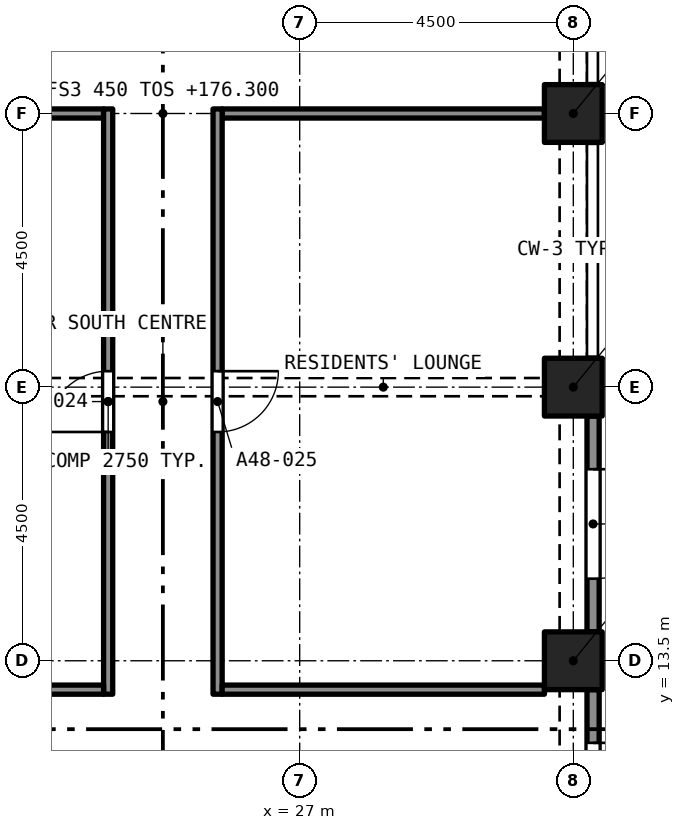
"""IFC4 building model, lengths in metres.
Left out: names, types, materials, properties, quantities, classifications, styles, units other than length and angle.
Written with IfcOpenShell. Run it as: python <this file> out.ifc"""

import sys

from ifc_helpers import new_model, si_unit, direction, frame, frame_2d, origin, origin_2d, place, context, subcontext, project, spatial, rectangle, extrude, element, fill, save


model = new_model("IFC4")
c1 = context("Model", 3, precision=1e-05, world=origin(), true_north=direction((0.0, 1.0)))
c2 = subcontext(c1, "Body", "Model", "MODEL_VIEW")
j1 = project(units=[si_unit("LENGTHUNIT", "METRE"), si_unit("PLANEANGLEUNIT", "RADIAN")], contexts=[c1])
p1 = place(None, origin())
s1 = spatial("IfcSite", under=j1, at=p1, CompositionType="ELEMENT")
p2 = place(p1, origin())
s2 = spatial("IfcBuilding", under=s1, at=p2, CompositionType="ELEMENT")
p3 = place(p2, frame((0.0, 0.0, 176.3)))
s3 = spatial("IfcBuildingStorey", under=s2, at=p3, CompositionType="ELEMENT", Elevation=176.3)
for number, where, z_axis, x_axis in (
    (1, (31.5, 13.5, 0.0), (0.0, 0.0, 1.0), (1.0, 0.0, 0.0)),
    (2, (31.5, 18.0, 0.0), (0.0, 0.0, 1.0), (1.0, 0.0, 0.0)),
    (3, (31.5, 22.5, 0.0), (0.0, 0.0, 1.0), (1.0, 0.0, 0.0)),
):
    element("IfcColumn", number, at=place(p3, frame(where, z_axis=z_axis, x_axis=x_axis)), inside=s3, PredefinedType="COLUMN", context=c2, shape_type="SweptSolid", body=[
        extrude(rectangle(XDim=0.95, YDim=0.95, at=origin_2d()), origin(), (0.0, 0.0, 1.0), 3.2),
    ])
p4 = place(p3, frame((31.825, 13.025, 0.0), z_axis=(0.0, 0.0, 1.0), x_axis=(0.0, -1.0, 0.0)))
e4 = element("IfcWall", 4, at=p4, inside=s3, PredefinedType="SOLIDWALL", context=c2, shape_type="SweptSolid", body=[
    extrude(rectangle(XDim=3.55, YDim=0.2, at=frame_2d((1.775, 0.0))), origin(), (0.0, 0.0, 1.0), 3.2),
])
p5 = place(p4, frame((0.875, 0.0, 0.0)))
e5 = element("IfcOpeningElement", 5, at=p5, cuts=e4, PredefinedType="OPENING", context=c2, shape_type="SweptSolid", body=[
    extrude(rectangle(XDim=1.8, YDim=2.4, at=frame_2d((0.9, 1.2))), frame((0.0, 0.11, 0.0), z_axis=(0.0, -1.0, 0.0), x_axis=(1.0, 0.0, 0.0)), (0.0, 0.0, 1.0), 0.22),
])
p6 = place(p3, frame((31.825, 17.525, 0.0), z_axis=(0.0, 0.0, 1.0), x_axis=(0.0, -1.0, 0.0)))
e6 = element("IfcWall", 6, at=p6, inside=s3, PredefinedType="SOLIDWALL", context=c2, shape_type="SweptSolid", body=[
    extrude(rectangle(XDim=3.55, YDim=0.2, at=frame_2d((1.775, 0.0))), origin(), (0.0, 0.0, 1.0), 3.2),
])
p7 = place(p6, frame((0.875, 0.0, 0.0)))
e7 = element("IfcOpeningElement", 7, at=p7, cuts=e6, PredefinedType="OPENING", context=c2, shape_type="SweptSolid", body=[
    extrude(rectangle(XDim=1.8, YDim=2.4, at=frame_2d((0.9, 1.2))), frame((0.0, 0.11, 0.0), z_axis=(0.0, -1.0, 0.0), x_axis=(1.0, 0.0, 0.0)), (0.0, 0.0, 1.0), 0.22),
])
for number, where, z_axis, x_axis in (
    (8, (18.475, 22.5, 0.0), (0.0, 0.0, 1.0), (1.0, 0.0, 0.0)),
    (9, (25.725, 22.5, 0.0), (0.0, 0.0, 1.0), (1.0, 0.0, 0.0)),
):
    element("IfcWall", number, at=place(p3, frame(where, z_axis=z_axis, x_axis=x_axis)), inside=s3, PredefinedType="PARTITIONING", context=c2, shape_type="SweptSolid", body=[
        extrude(rectangle(XDim=5.3, YDim=0.15, at=frame_2d((2.65, 0.0))), origin(), (0.0, 0.0, 1.0), 2.75),
    ])
p8 = place(p3, frame((23.85, 12.95, 0.0), z_axis=(0.0, 0.0, 1.0), x_axis=(0.0, 1.0, 0.0)))
e10 = element("IfcWall", 10, at=p8, inside=s3, PredefinedType="PARTITIONING", context=c2, shape_type="SweptSolid", body=[
    extrude(rectangle(XDim=9.625, YDim=0.15, at=frame_2d((4.812, 0.0))), origin(), (0.0, 0.0, 1.0), 2.75),
])
p9 = place(p8, frame((4.312, 0.0, 0.0)))
e11 = element("IfcOpeningElement", 11, at=p9, cuts=e10, PredefinedType="OPENING", context=c2, shape_type="SweptSolid", body=[
    extrude(rectangle(XDim=1.0, YDim=2.1, at=frame_2d((0.5, 1.05))), frame((0.0, 0.085, 0.0), z_axis=(0.0, -1.0, 0.0), x_axis=(1.0, 0.0, 0.0)), (0.0, 0.0, 1.0), 0.17),
])
p10 = place(p3, frame((25.65, 22.575, 0.0), z_axis=(0.0, 0.0, 1.0), x_axis=(0.0, -1.0, 0.0)))
e12 = element("IfcWall", 12, at=p10, inside=s3, PredefinedType="PARTITIONING", context=c2, shape_type="SweptSolid", body=[
    extrude(rectangle(XDim=9.625, YDim=0.15, at=frame_2d((4.812, 0.0))), origin(), (0.0, 0.0, 1.0), 2.75),
])
p11 = place(p10, frame((4.312, 0.0, 0.0)))
e13 = element("IfcOpeningElement", 13, at=p11, cuts=e12, PredefinedType="OPENING", context=c2, shape_type="SweptSolid", body=[
    extrude(rectangle(XDim=1.0, YDim=2.1, at=frame_2d((0.5, 1.05))), frame((0.0, 0.085, 0.0), z_axis=(0.0, -1.0, 0.0), x_axis=(1.0, 0.0, 0.0)), (0.0, 0.0, 1.0), 0.17),
])
for number, where, z_axis, x_axis in (
    (14, (18.475, 13.025, 0.0), (0.0, 0.0, 1.0), (1.0, 0.0, 0.0)),
    (15, (25.725, 13.025, 0.0), (0.0, 0.0, 1.0), (1.0, 0.0, 0.0)),
):
    element("IfcWall", number, at=place(p3, frame(where, z_axis=z_axis, x_axis=x_axis)), inside=s3, PredefinedType="PARTITIONING", context=c2, shape_type="SweptSolid", body=[
        extrude(rectangle(XDim=5.3, YDim=0.15, at=frame_2d((2.65, 0.0))), origin(), (0.0, 0.0, 1.0), 2.75),
    ])
p12 = place(p5, origin())
e16 = element("IfcDoor", 16, at=p12, inside=s3, OperationType="DOUBLE_DOOR_SINGLE_SWING", PredefinedType="DOOR", context=c2, shape_type="SweptSolid", body=[
    extrude(rectangle(XDim=1.8, YDim=2.4, at=frame_2d((0.9, 1.2))), frame((0.0, 0.025, 0.0), z_axis=(0.0, -1.0, 0.0), x_axis=(1.0, 0.0, 0.0)), (0.0, 0.0, 1.0), 0.05),
])
fill(e5, e16)
p13 = place(p7, origin())
e17 = element("IfcDoor", 17, at=p13, inside=s3, OperationType="DOUBLE_DOOR_SINGLE_SWING", PredefinedType="DOOR", context=c2, shape_type="SweptSolid", body=[
    extrude(rectangle(XDim=1.8, YDim=2.4, at=frame_2d((0.9, 1.2))), frame((0.0, 0.025, 0.0), z_axis=(0.0, -1.0, 0.0), x_axis=(1.0, 0.0, 0.0)), (0.0, 0.0, 1.0), 0.05),
])
fill(e7, e17)
p14 = place(p9, origin())
e18 = element("IfcDoor", 18, at=p14, inside=s3, OperationType="SINGLE_SWING_RIGHT", PredefinedType="DOOR", context=c2, shape_type="SweptSolid", body=[
    extrude(rectangle(XDim=1.0, YDim=2.1, at=frame_2d((0.5, 1.05))), frame((0.0, 0.025, 0.0), z_axis=(0.0, -1.0, 0.0), x_axis=(1.0, 0.0, 0.0)), (0.0, 0.0, 1.0), 0.05),
])
fill(e11, e18)
p15 = place(p11, origin())
e19 = element("IfcDoor", 19, at=p15, inside=s3, OperationType="SINGLE_SWING_RIGHT", PredefinedType="DOOR", context=c2, shape_type="SweptSolid", body=[
    extrude(rectangle(XDim=1.0, YDim=2.1, at=frame_2d((0.5, 1.05))), frame((0.0, 0.025, 0.0), z_axis=(0.0, -1.0, 0.0), x_axis=(1.0, 0.0, 0.0)), (0.0, 0.0, 1.0), 0.05),
])
fill(e13, e19)
save(model, sys.argv[1])
